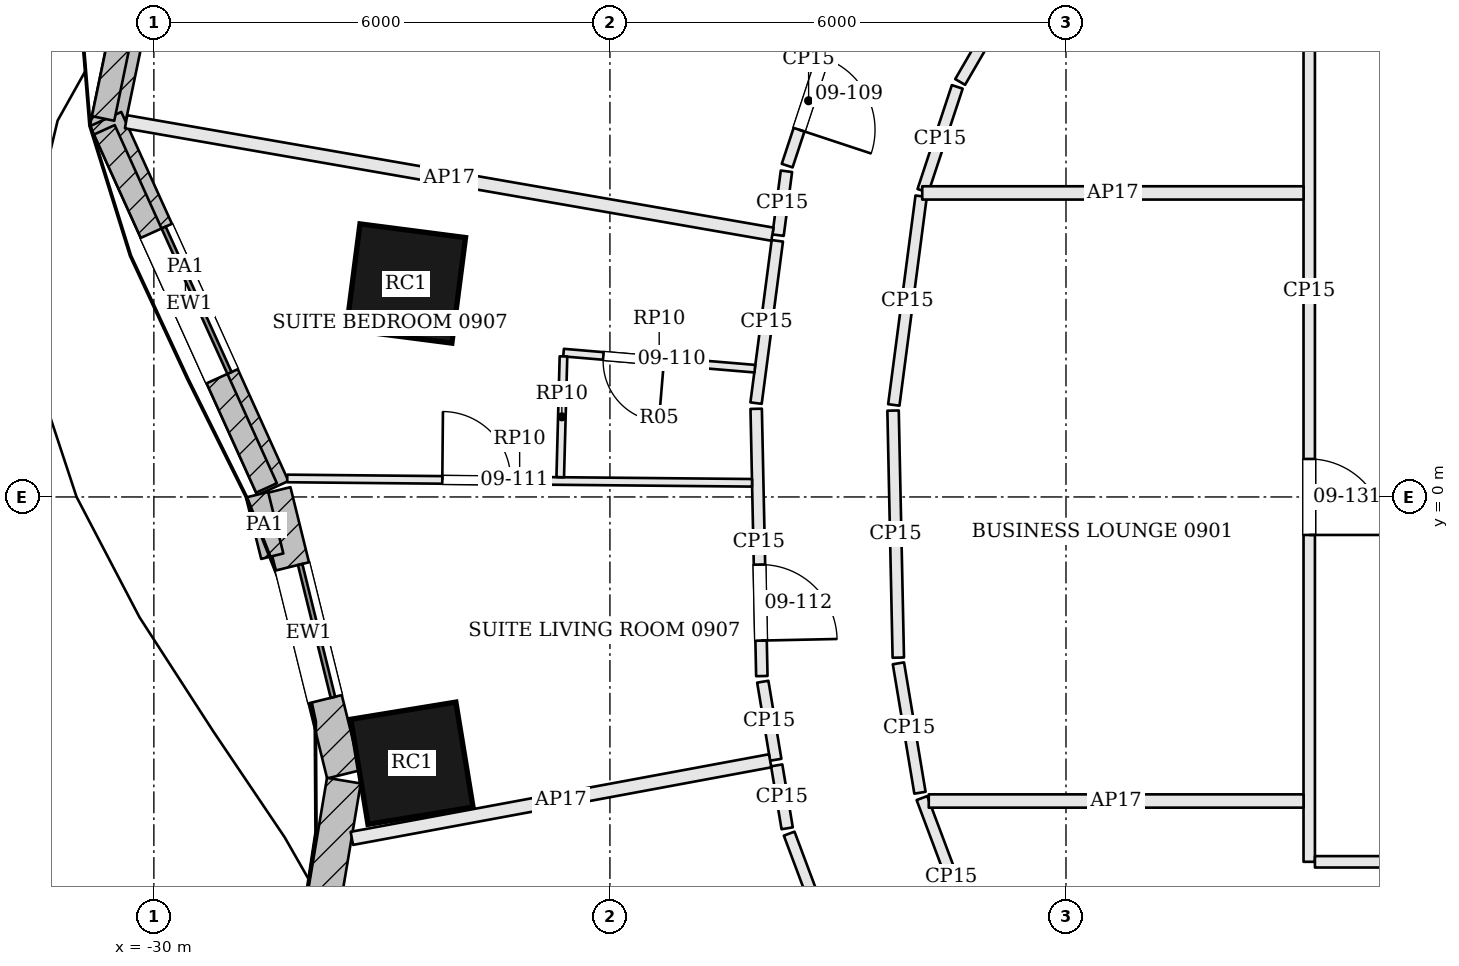
"""IFC4 building model, lengths in metres.
Left out: names, types, materials, properties, quantities, classifications, styles, units other than length and angle.
Written with IfcOpenShell. Run it as: python <this file> out.ifc"""

import sys

from ifc_helpers import new_model, si_unit, direction, frame, frame_2d, origin, origin_2d, place, context, subcontext, project, spatial, rectangle, extrude, element, fill, save


model = new_model("IFC4")
c1 = context("Model", 3, precision=1e-05, world=origin(), true_north=direction((0.0, 1.0)))
c2 = subcontext(c1, "Body", "Model", "MODEL_VIEW")
j1 = project(units=[si_unit("LENGTHUNIT", "METRE"), si_unit("PLANEANGLEUNIT", "RADIAN")], contexts=[c1])
p1 = place(None, origin())
s1 = spatial("IfcSite", under=j1, at=p1, CompositionType="ELEMENT")
p2 = place(p1, origin())
s2 = spatial("IfcBuilding", under=s1, at=p2, CompositionType="ELEMENT")
p3 = place(p2, frame((0.0, 0.0, 48.3)))
s3 = spatial("IfcBuildingStorey", under=s2, at=p3, CompositionType="ELEMENT", Elevation=48.3)
for number, where, z_axis, x_axis in (
    (1, (-26.684, 2.808, 0.0), (0.0, 0.0, 1.0), (-0.128, -0.992, 0.0)),
    (2, (-26.605, -3.503, 0.0), (0.0, 0.0, 1.0), (0.161, -0.987, 0.0)),
):
    element("IfcColumn", number, at=place(p3, frame(where, z_axis=z_axis, x_axis=x_axis)), inside=s3, PredefinedType="COLUMN", context=c2, shape_type="SweptSolid", body=[
        extrude(rectangle(XDim=1.4, YDim=1.4, at=origin_2d()), origin(), (0.0, 0.0, 1.0), 3.6),
    ])
p4 = place(p3, frame((-29.621, 9.65, 0.0), z_axis=(0.0, 0.0, 1.0), x_axis=(-0.203505836306, -0.979073732969, 0.0)))
e3 = element("IfcWall", 3, at=p4, inside=s3, PredefinedType="SOLIDWALL", context=c2, shape_type="SweptSolid", body=[
    extrude(rectangle(XDim=4.914, YDim=0.45, at=frame_2d((2.457, 0.0))), origin(), (0.0, 0.0, 1.0), 3.4),
])
p5 = place(p4, frame((1.407, 0.0, 0.9)))
e4 = element("IfcOpeningElement", 4, at=p5, cuts=e3, PredefinedType="OPENING", context=c2, shape_type="SweptSolid", body=[
    extrude(rectangle(XDim=2.1, YDim=2.0, at=frame_2d((1.05, 1.0))), frame((0.0, 0.235, 0.0), z_axis=(0.0, -1.0, 0.0), x_axis=(1.0, 0.0, 0.0)), (0.0, 0.0, 1.0), 0.47),
])
p6 = place(p3, frame((-30.634, 4.972, 0.0), z_axis=(0.0, 0.0, 1.0), x_axis=(0.412494644758, -0.910960025493, 0.0)))
e5 = element("IfcWall", 5, at=p6, inside=s3, PredefinedType="SOLIDWALL", context=c2, shape_type="SweptSolid", body=[
    extrude(rectangle(XDim=5.33, YDim=0.45, at=frame_2d((2.665, 0.0))), origin(), (0.0, 0.0, 1.0), 3.4),
])
p7 = place(p6, frame((1.615, 0.0, 0.9)))
e6 = element("IfcOpeningElement", 6, at=p7, cuts=e5, PredefinedType="OPENING", context=c2, shape_type="SweptSolid", body=[
    extrude(rectangle(XDim=2.1, YDim=2.0, at=frame_2d((1.05, 1.0))), frame((0.0, 0.235, 0.0), z_axis=(0.0, -1.0, 0.0), x_axis=(1.0, 0.0, 0.0)), (0.0, 0.0, 1.0), 0.47),
])
p8 = place(p3, frame((-28.422, 0.075, 0.0), z_axis=(0.0, 0.0, 1.0), x_axis=(0.239809222807, -0.970820033094, 0.0)))
e7 = element("IfcWall", 7, at=p8, inside=s3, PredefinedType="SOLIDWALL", context=c2, shape_type="SweptSolid", body=[
    extrude(rectangle(XDim=3.836, YDim=0.45, at=frame_2d((1.918, 0.0))), origin(), (0.0, 0.0, 1.0), 3.4),
])
p9 = place(p8, frame((1.018, 0.0, 0.9)))
e8 = element("IfcOpeningElement", 8, at=p9, cuts=e7, PredefinedType="OPENING", context=c2, shape_type="SweptSolid", body=[
    extrude(rectangle(XDim=1.8, YDim=2.0, at=frame_2d((0.9, 1.0))), frame((0.0, 0.235, 0.0), z_axis=(0.0, -1.0, 0.0), x_axis=(1.0, 0.0, 0.0)), (0.0, 0.0, 1.0), 0.47),
])
p10 = place(p3, frame((-27.5, -3.732, 0.0), z_axis=(0.0, 0.0, 1.0), x_axis=(-0.165174419367, -0.986264371853, 0.0)))
e9 = element("IfcWall", 9, at=p10, inside=s3, PredefinedType="SOLIDWALL", context=c2, shape_type="SweptSolid", body=[
    extrude(rectangle(XDim=5.769, YDim=0.45, at=frame_2d((2.885, 0.0))), origin(), (0.0, 0.0, 1.0), 3.4),
])
p11 = place(p10, frame((1.834, 0.0, 0.9)))
e10 = element("IfcOpeningElement", 10, at=p11, cuts=e9, PredefinedType="OPENING", context=c2, shape_type="SweptSolid", body=[
    extrude(rectangle(XDim=2.1, YDim=2.0, at=frame_2d((1.05, 1.0))), frame((0.0, 0.235, 0.0), z_axis=(0.0, -1.0, 0.0), x_axis=(1.0, 0.0, 0.0)), (0.0, 0.0, 1.0), 0.47),
])
p12 = place(p3, frame((-29.751, 9.39, 3.6), z_axis=(0.0, 0.0, 1.0), x_axis=(-0.203510555438, -0.97907275206, 0.0)))
e11 = element("IfcWall", 11, at=p12, inside=s3, PredefinedType="PARAPET", context=c2, shape_type="SweptSolid", body=[
    extrude(rectangle(XDim=4.505, YDim=0.3, at=frame_2d((2.252, 0.0))), origin(), (0.0, 0.0, 1.0), 1.1),
])
p13 = place(p3, frame((-30.652, 4.83, 3.6), z_axis=(0.0, 0.0, 1.0), x_axis=(0.412522333553, -0.910947487136, 0.0)))
e12 = element("IfcWall", 12, at=p13, inside=s3, PredefinedType="PARAPET", context=c2, shape_type="SweptSolid", body=[
    extrude(rectangle(XDim=5.173, YDim=0.3, at=frame_2d((2.586, 0.0))), origin(), (0.0, 0.0, 1.0), 1.1),
])
p14 = place(p3, frame((-28.642, 0.029, 3.6), z_axis=(0.0, 0.0, 1.0), x_axis=(0.239775825721, -0.970828282138, 0.0)))
e13 = element("IfcWall", 13, at=p14, inside=s3, PredefinedType="PARAPET", context=c2, shape_type="SweptSolid", body=[
    extrude(rectangle(XDim=0.833, YDim=0.3, at=frame_2d((0.417, 0.0))), origin(), (0.0, 0.0, 1.0), 1.1),
])
p15 = place(p3, frame((-21.104, 6.066, 0.0), z_axis=(0.0, 0.0, 1.0), x_axis=(-0.313700743044, -0.949521902756, 0.0)))
e14 = element("IfcWall", 14, at=p15, inside=s3, PredefinedType="PARTITIONING", context=c2, shape_type="SweptSolid", body=[
    extrude(rectangle(XDim=1.798, YDim=0.15, at=frame_2d((0.899, 0.0))), origin(), (0.0, 0.0, 1.0), 2.68),
])
p16 = place(p15, frame((0.3, 0.0, 0.0)))
e15 = element("IfcOpeningElement", 15, at=p16, cuts=e14, PredefinedType="OPENING", context=c2, shape_type="SweptSolid", body=[
    extrude(rectangle(XDim=1.0, YDim=2.1, at=frame_2d((0.5, 1.05))), frame((0.0, 0.085, 0.0), z_axis=(0.0, -1.0, 0.0), x_axis=(1.0, 0.0, 0.0)), (0.0, 0.0, 1.0), 0.17),
])
p17 = place(p3, frame((-21.678, 4.285, 0.0), z_axis=(0.0, 0.0, 1.0), x_axis=(-0.129917972145, -0.991524745286, 0.0)))
e16 = element("IfcWall", 16, at=p17, inside=s3, PredefinedType="PARTITIONING", context=c2, shape_type="SweptSolid", body=[
    extrude(rectangle(XDim=0.847, YDim=0.15, at=frame_2d((0.424, 0.0))), origin(), (0.0, 0.0, 1.0), 2.68),
])
p18 = place(p3, frame((-30.366, 4.936, 0.0), z_axis=(0.0, 0.0, 1.0), x_axis=(0.985210509232, -0.171348336728, 0.0)))
e17 = element("IfcWall", 17, at=p18, inside=s3, PredefinedType="PARTITIONING", context=c2, shape_type="SweptSolid", body=[
    extrude(rectangle(XDim=8.632, YDim=0.175, at=frame_2d((4.316, 0.0))), origin(), (0.0, 0.0, 1.0), 2.68),
])
p19 = place(p3, frame((-21.798, 3.37, 0.0), z_axis=(0.0, 0.0, 1.0), x_axis=(-0.130032209746, -0.991509770213, 0.0)))
e18 = element("IfcWall", 18, at=p19, inside=s3, PredefinedType="PARTITIONING", context=c2, shape_type="SweptSolid", body=[
    extrude(rectangle(XDim=2.154, YDim=0.15, at=frame_2d((1.077, 0.0))), origin(), (0.0, 0.0, 1.0), 2.68),
])
p20 = place(p3, frame((-22.076, 1.16, 0.0), z_axis=(0.0, 0.0, 1.0), x_axis=(0.021172866829, -0.999775829729, 0.0)))
e19 = element("IfcWall", 19, at=p20, inside=s3, PredefinedType="PARTITIONING", context=c2, shape_type="SweptSolid", body=[
    extrude(rectangle(XDim=3.517, YDim=0.15, at=frame_2d((1.758, 0.0))), origin(), (0.0, 0.0, 1.0), 2.68),
])
p21 = place(p20, frame((2.05, 0.0, 0.0)))
e20 = element("IfcOpeningElement", 20, at=p21, cuts=e19, PredefinedType="OPENING", context=c2, shape_type="SweptSolid", body=[
    extrude(rectangle(XDim=1.0, YDim=2.1, at=frame_2d((0.5, 1.05))), frame((0.0, 0.085, 0.0), z_axis=(0.0, -1.0, 0.0), x_axis=(1.0, 0.0, 0.0)), (0.0, 0.0, 1.0), 0.17),
])
p22 = place(p3, frame((-21.989, -2.43, 0.0), z_axis=(0.0, 0.0, 1.0), x_axis=(0.164170791844, -0.986431929281, 0.0)))
e21 = element("IfcWall", 21, at=p22, inside=s3, PredefinedType="PARTITIONING", context=c2, shape_type="SweptSolid", body=[
    extrude(rectangle(XDim=1.041, YDim=0.15, at=frame_2d((0.521, 0.0))), origin(), (0.0, 0.0, 1.0), 2.68),
])
p23 = place(p3, frame((-27.396, -4.491, 0.0), z_axis=(0.0, 0.0, 1.0), x_axis=(0.983238590395, 0.182323543069, 0.0)))
e22 = element("IfcWall", 22, at=p23, inside=s3, PredefinedType="PARTITIONING", context=c2, shape_type="SweptSolid", body=[
    extrude(rectangle(XDim=5.597, YDim=0.175, at=frame_2d((2.799, 0.0))), origin(), (0.0, 0.0, 1.0), 2.68),
])
p24 = place(p3, frame((-21.806, -3.531, 0.0), z_axis=(0.0, 0.0, 1.0), x_axis=(0.164068764938, -0.986448904086, 0.0)))
e23 = element("IfcWall", 23, at=p24, inside=s3, PredefinedType="PARTITIONING", context=c2, shape_type="SweptSolid", body=[
    extrude(rectangle(XDim=0.839, YDim=0.15, at=frame_2d((0.42, 0.0))), origin(), (0.0, 0.0, 1.0), 2.68),
])
p25 = place(p3, frame((-21.642, -4.429, 0.0), z_axis=(0.0, 0.0, 1.0), x_axis=(0.350963719781, -0.936389057709, 0.0)))
e24 = element("IfcWall", 24, at=p25, inside=s3, PredefinedType="PARTITIONING", context=c2, shape_type="SweptSolid", body=[
    extrude(rectangle(XDim=2.68, YDim=0.15, at=frame_2d((1.34, 0.0))), origin(), (0.0, 0.0, 1.0), 2.68),
])
p26 = place(p25, frame((1.199, 0.0, 0.0)))
e25 = element("IfcOpeningElement", 25, at=p26, cuts=e24, PredefinedType="OPENING", context=c2, shape_type="SweptSolid", body=[
    extrude(rectangle(XDim=1.0, YDim=2.1, at=frame_2d((0.5, 1.05))), frame((0.0, 0.085, 0.0), z_axis=(0.0, -1.0, 0.0), x_axis=(1.0, 0.0, 0.0)), (0.0, 0.0, 1.0), 0.17),
])
p27 = place(p3, frame((-19.921, -3.891, 0.0), z_axis=(0.0, 0.0, 1.0), x_axis=(-0.164100753818, 0.986443583078, 0.0)))
e26 = element("IfcWall", 26, at=p27, inside=s3, PredefinedType="PARTITIONING", context=c2, shape_type="SweptSolid", body=[
    extrude(rectangle(XDim=1.726, YDim=0.15, at=frame_2d((0.863, 0.0))), origin(), (0.0, 0.0, 1.0), 2.68),
])
p28 = place(p3, frame((-20.206, -2.114, 0.0), z_axis=(0.0, 0.0, 1.0), x_axis=(-0.021179142616, 0.999775696803, 0.0)))
e27 = element("IfcWall", 27, at=p28, inside=s3, PredefinedType="PARTITIONING", context=c2, shape_type="SweptSolid", body=[
    extrude(rectangle(XDim=3.251, YDim=0.15, at=frame_2d((1.625, 0.0))), origin(), (0.0, 0.0, 1.0), 2.68),
])
p29 = place(p3, frame((-20.265, 1.211, 0.0), z_axis=(0.0, 0.0, 1.0), x_axis=(0.129957307165, 0.991519590484, 0.0)))
e28 = element("IfcWall", 28, at=p29, inside=s3, PredefinedType="PARTITIONING", context=c2, shape_type="SweptSolid", body=[
    extrude(rectangle(XDim=2.769, YDim=0.15, at=frame_2d((1.385, 0.0))), origin(), (0.0, 0.0, 1.0), 2.68),
])
p30 = place(p3, frame((-19.882, 4.028, 0.0), z_axis=(0.0, 0.0, 1.0), x_axis=(0.313632756375, 0.949544361327, 0.0)))
e29 = element("IfcWall", 29, at=p30, inside=s3, PredefinedType="PARTITIONING", context=c2, shape_type="SweptSolid", body=[
    extrude(rectangle(XDim=1.44, YDim=0.15, at=frame_2d((0.72, 0.0))), origin(), (0.0, 0.0, 1.0), 2.68),
])
p31 = place(p3, frame((-19.393, 5.46, 0.0), z_axis=(0.0, 0.0, 1.0), x_axis=(0.502296094562, 0.864695688314, 0.0)))
e30 = element("IfcWall", 30, at=p31, inside=s3, PredefinedType="PARTITIONING", context=c2, shape_type="SweptSolid", body=[
    extrude(rectangle(XDim=2.237, YDim=0.15, at=frame_2d((1.119, 0.0))), origin(), (0.0, 0.0, 1.0), 2.68),
])
p32 = place(p3, frame((-14.8, 10.208, 0.0), z_axis=(0.0, 0.0, 1.0), x_axis=(0.0, -1.0, 0.0)))
e31 = element("IfcWall", 31, at=p32, inside=s3, PredefinedType="PARTITIONING", context=c2, shape_type="SweptSolid", body=[
    extrude(rectangle(XDim=15.008, YDim=0.15, at=frame_2d((7.504, 0.0))), origin(), (0.0, 0.0, 1.0), 2.68),
])
p33 = place(p32, frame((2.717, 0.0, 0.0)))
e32 = element("IfcOpeningElement", 32, at=p33, cuts=e31, PredefinedType="OPENING", context=c2, shape_type="SweptSolid", body=[
    extrude(rectangle(XDim=0.7, YDim=2.1, at=frame_2d((0.35, 1.05))), frame((0.0, 0.085, 0.0), z_axis=(0.0, -1.0, 0.0), x_axis=(1.0, 0.0, 0.0)), (0.0, 0.0, 1.0), 0.17),
])
p34 = place(p32, frame((9.708, 0.0, 0.0)))
e33 = element("IfcOpeningElement", 33, at=p34, cuts=e31, PredefinedType="OPENING", context=c2, shape_type="SweptSolid", body=[
    extrude(rectangle(XDim=1.0, YDim=2.1, at=frame_2d((0.5, 1.05))), frame((0.0, 0.085, 0.0), z_axis=(0.0, -1.0, 0.0), x_axis=(1.0, 0.0, 0.0)), (0.0, 0.0, 1.0), 0.17),
])
p35 = place(p3, frame((-14.725, -4.8, 0.0), z_axis=(0.0, 0.0, 1.0), x_axis=(1.0, 0.0, 0.0)))
e34 = element("IfcWall", 34, at=p35, inside=s3, PredefinedType="PARTITIONING", context=c2, shape_type="SweptSolid", body=[
    extrude(rectangle(XDim=29.525, YDim=0.15, at=frame_2d((14.763, 0.0))), origin(), (0.0, 0.0, 1.0), 2.68),
])
p36 = place(p35, frame((2.075, 0.0, 0.0)))
e35 = element("IfcOpeningElement", 35, at=p36, cuts=e34, PredefinedType="OPENING", context=c2, shape_type="SweptSolid", body=[
    extrude(rectangle(XDim=1.0, YDim=2.4, at=frame_2d((0.5, 1.2))), frame((0.0, 0.085, 0.0), z_axis=(0.0, -1.0, 0.0), x_axis=(1.0, 0.0, 0.0)), (0.0, 0.0, 1.0), 0.17),
])
p37 = place(p35, frame((13.825, 0.0, 0.0)))
e36 = element("IfcOpeningElement", 36, at=p37, cuts=e34, PredefinedType="OPENING", context=c2, shape_type="SweptSolid", body=[
    extrude(rectangle(XDim=1.8, YDim=2.1, at=frame_2d((0.9, 1.05))), frame((0.0, 0.085, 0.0), z_axis=(0.0, -1.0, 0.0), x_axis=(1.0, 0.0, 0.0)), (0.0, 0.0, 1.0), 0.17),
])
p38 = place(p35, frame((26.375, 0.0, 0.0)))
e37 = element("IfcOpeningElement", 37, at=p38, cuts=e34, PredefinedType="OPENING", context=c2, shape_type="SweptSolid", body=[
    extrude(rectangle(XDim=1.0, YDim=2.4, at=frame_2d((0.5, 1.2))), frame((0.0, 0.085, 0.0), z_axis=(0.0, -1.0, 0.0), x_axis=(1.0, 0.0, 0.0)), (0.0, 0.0, 1.0), 0.17),
])
p39 = place(p3, frame((-19.121, -6.026, 0.0), z_axis=(0.0, 0.0, 1.0), x_axis=(-0.351026357955, 0.936365578191, 0.0)))
e38 = element("IfcWall", 38, at=p39, inside=s3, PredefinedType="PARTITIONING", context=c2, shape_type="SweptSolid", body=[
    extrude(rectangle(XDim=2.205, YDim=0.15, at=frame_2d((1.103, 0.0))), origin(), (0.0, 0.0, 1.0), 2.68),
])
p40 = place(p3, frame((-28.245, 0.243, 0.0), z_axis=(0.0, 0.0, 1.0), x_axis=(0.999955988555, -0.00938194823, 0.0)))
e39 = element("IfcWall", 39, at=p40, inside=s3, PredefinedType="PARTITIONING", context=c2, shape_type="SweptSolid", body=[
    extrude(rectangle(XDim=6.115, YDim=0.1, at=frame_2d((3.058, 0.0))), origin(), (0.0, 0.0, 1.0), 2.934),
])
p41 = place(p40, frame((2.04, 0.0, 0.0)))
e40 = element("IfcOpeningElement", 40, at=p41, cuts=e39, PredefinedType="OPENING", context=c2, shape_type="SweptSolid", body=[
    extrude(rectangle(XDim=0.9, YDim=2.4, at=frame_2d((0.45, 1.2))), frame((0.0, 0.06, 0.0), z_axis=(0.0, -1.0, 0.0), x_axis=(1.0, 0.0, 0.0)), (0.0, 0.0, 1.0), 0.12),
])
p42 = place(p3, frame((-22.094, 1.688, 0.0), z_axis=(0.0, 0.0, 1.0), x_axis=(-0.996480101065, 0.083829637844, 0.0)))
e41 = element("IfcWall", 41, at=p42, inside=s3, PredefinedType="PARTITIONING", context=c2, shape_type="SweptSolid", body=[
    extrude(rectangle(XDim=2.525, YDim=0.1, at=frame_2d((1.262, 0.0))), origin(), (0.0, 0.0, 1.0), 2.934),
])
p43 = place(p42, frame((1.2, 0.0, 0.0)))
e42 = element("IfcOpeningElement", 42, at=p43, cuts=e41, PredefinedType="OPENING", context=c2, shape_type="SweptSolid", body=[
    extrude(rectangle(XDim=0.8, YDim=2.1, at=frame_2d((0.4, 1.05))), frame((0.0, 0.06, 0.0), z_axis=(0.0, -1.0, 0.0), x_axis=(1.0, 0.0, 0.0)), (0.0, 0.0, 1.0), 0.12),
])
p44 = place(p3, frame((-24.611, 1.849, 0.0), z_axis=(0.0, 0.0, 1.0), x_axis=(-0.026872012964, -0.999638882257, 0.0)))
e43 = element("IfcWall", 43, at=p44, inside=s3, PredefinedType="PARTITIONING", context=c2, shape_type="SweptSolid", body=[
    extrude(rectangle(XDim=1.59, YDim=0.1, at=frame_2d((0.795, 0.0))), origin(), (0.0, 0.0, 1.0), 2.934),
])
p45 = place(p3, frame((-19.891, 4.0, 0.0), z_axis=(0.0, 0.0, 1.0), x_axis=(1.0, 0.0, 0.0)))
e44 = element("IfcWall", 44, at=p45, inside=s3, PredefinedType="PARTITIONING", context=c2, shape_type="SweptSolid", body=[
    extrude(rectangle(XDim=5.016, YDim=0.175, at=frame_2d((2.508, 0.0))), origin(), (0.0, 0.0, 1.0), 2.68),
])
p46 = place(p3, frame((-19.805, -4.0, 0.0), z_axis=(0.0, 0.0, 1.0), x_axis=(1.0, 0.0, 0.0)))
e45 = element("IfcWall", 45, at=p46, inside=s3, PredefinedType="PARTITIONING", context=c2, shape_type="SweptSolid", body=[
    extrude(rectangle(XDim=4.93, YDim=0.175, at=frame_2d((2.465, 0.0))), origin(), (0.0, 0.0, 1.0), 2.68),
])
p47 = place(p7, origin())
e46 = element("IfcWindow", 46, at=p47, inside=s3, PartitioningType="SINGLE_PANEL", PredefinedType="WINDOW", context=c2, shape_type="SweptSolid", body=[
    extrude(rectangle(XDim=2.1, YDim=2.0, at=frame_2d((1.05, 1.0))), frame((0.0, 0.135, 0.0), z_axis=(0.0, -1.0, 0.0), x_axis=(1.0, 0.0, 0.0)), (0.0, 0.0, 1.0), 0.06),
])
fill(e6, e46)
p48 = place(p9, origin())
e47 = element("IfcWindow", 47, at=p48, inside=s3, PartitioningType="SINGLE_PANEL", PredefinedType="WINDOW", context=c2, shape_type="SweptSolid", body=[
    extrude(rectangle(XDim=1.8, YDim=2.0, at=frame_2d((0.9, 1.0))), frame((0.0, 0.135, 0.0), z_axis=(0.0, -1.0, 0.0), x_axis=(1.0, 0.0, 0.0)), (0.0, 0.0, 1.0), 0.06),
])
fill(e8, e47)
p49 = place(p16, origin())
e48 = element("IfcDoor", 48, at=p49, inside=s3, OperationType="SINGLE_SWING_RIGHT", PredefinedType="DOOR", context=c2, shape_type="SweptSolid", body=[
    extrude(rectangle(XDim=1.0, YDim=2.1, at=frame_2d((0.5, 1.05))), frame((0.0, 0.025, 0.0), z_axis=(0.0, -1.0, 0.0), x_axis=(1.0, 0.0, 0.0)), (0.0, 0.0, 1.0), 0.05),
])
fill(e15, e48)
p50 = place(p43, origin())
e49 = element("IfcDoor", 49, at=p50, inside=s3, OperationType="SINGLE_SWING_LEFT", PredefinedType="DOOR", context=c2, shape_type="SweptSolid", body=[
    extrude(rectangle(XDim=0.8, YDim=2.1, at=frame_2d((0.4, 1.05))), frame((0.0, 0.025, 0.0), z_axis=(0.0, -1.0, 0.0), x_axis=(1.0, 0.0, 0.0)), (0.0, 0.0, 1.0), 0.05),
])
fill(e42, e49)
p51 = place(p41, origin())
e50 = element("IfcDoor", 50, at=p51, inside=s3, OperationType="SINGLE_SWING_LEFT", PredefinedType="DOOR", context=c2, shape_type="SweptSolid", body=[
    extrude(rectangle(XDim=0.9, YDim=2.4, at=frame_2d((0.45, 1.2))), frame((0.0, 0.025, 0.0), z_axis=(0.0, -1.0, 0.0), x_axis=(1.0, 0.0, 0.0)), (0.0, 0.0, 1.0), 0.05),
])
fill(e40, e50)
p52 = place(p21, origin())
e51 = element("IfcDoor", 51, at=p52, inside=s3, OperationType="SINGLE_SWING_RIGHT", PredefinedType="DOOR", context=c2, shape_type="SweptSolid", body=[
    extrude(rectangle(XDim=1.0, YDim=2.1, at=frame_2d((0.5, 1.05))), frame((0.0, 0.025, 0.0), z_axis=(0.0, -1.0, 0.0), x_axis=(1.0, 0.0, 0.0)), (0.0, 0.0, 1.0), 0.05),
])
fill(e20, e51)
p53 = place(p34, origin())
e52 = element("IfcDoor", 52, at=p53, inside=s3, OperationType="SINGLE_SWING_RIGHT", PredefinedType="DOOR", context=c2, shape_type="SweptSolid", body=[
    extrude(rectangle(XDim=1.0, YDim=2.1, at=frame_2d((0.5, 1.05))), frame((0.0, 0.025, 0.0), z_axis=(0.0, -1.0, 0.0), x_axis=(1.0, 0.0, 0.0)), (0.0, 0.0, 1.0), 0.05),
])
fill(e33, e52)
save(model, sys.argv[1])
